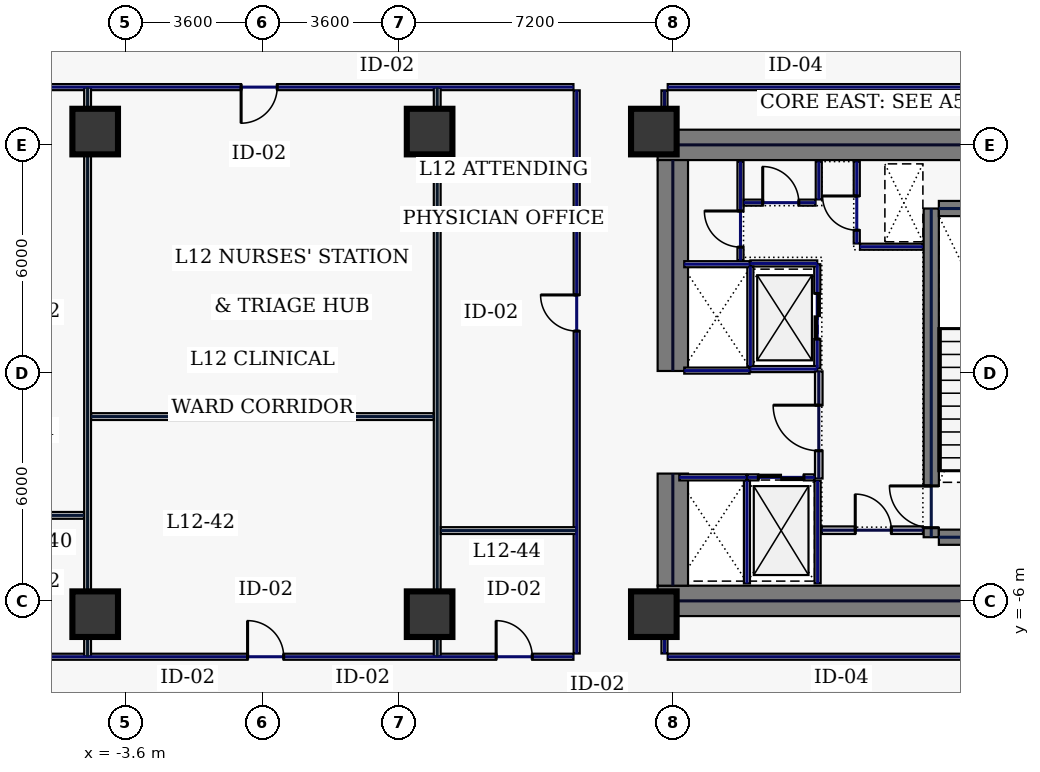
"""IFC4 building model, lengths in metres.
Left out: names, types, materials, properties, quantities, classifications, styles, units other than length and angle.
Written with IfcOpenShell. Run it as: python <this file> out.ifc"""

import sys

from ifc_helpers import new_model, si_unit, direction, frame, frame_2d, origin, origin_2d, place, context, subcontext, project, spatial, rectangle, hollow_rectangle, extrude, element, fill, save


model = new_model("IFC4")
c1 = context("Model", 3, precision=1e-05, world=origin(), true_north=direction((0.0, 1.0)))
c2 = subcontext(c1, "Body", "Model", "MODEL_VIEW")
j1 = project(units=[si_unit("LENGTHUNIT", "METRE"), si_unit("PLANEANGLEUNIT", "RADIAN")], contexts=[c1])
p1 = place(None, origin())
s1 = spatial("IfcSite", under=j1, at=p1, CompositionType="ELEMENT")
p2 = place(p1, origin())
s2 = spatial("IfcBuilding", under=s1, at=p2, CompositionType="ELEMENT")
p3 = place(p2, frame((0.0, 0.0, 59.4)))
s3 = spatial("IfcBuildingStorey", under=s2, at=p3, CompositionType="ELEMENT", Elevation=59.4)
for number, where, z_axis, x_axis in (
    (1, (10.4, 6.0, 0.0), (0.0, 0.0, 1.0), (1.0, 0.0, 0.0)),
    (2, (10.4, -6.0, 0.0), (0.0, 0.0, 1.0), (1.0, 0.0, 0.0)),
):
    element("IfcWall", number, at=place(p3, frame(where, z_axis=z_axis, x_axis=x_axis)), inside=s3, PredefinedType="SHEAR", context=c2, shape_type="SweptSolid", body=[
        extrude(rectangle(XDim=11.6, YDim=0.8, at=frame_2d((5.8, 0.0))), origin(), (0.0, 0.0, 1.0), 3.74),
    ])
p4 = place(p3, frame((10.8, -5.6, 0.0), z_axis=(0.0, 0.0, 1.0), x_axis=(0.0, 1.0, 0.0)))
e3 = element("IfcWall", 3, at=p4, inside=s3, PredefinedType="SHEAR", context=c2, shape_type="SweptSolid", body=[
    extrude(rectangle(XDim=2.95, YDim=0.8, at=frame_2d((1.475, 0.0))), origin(), (0.0, 0.0, 1.0), 3.74),
])
p5 = place(p3, frame((10.8, 0.05, 0.0), z_axis=(0.0, 0.0, 1.0), x_axis=(0.0, 1.0, 0.0)))
e4 = element("IfcWall", 4, at=p5, inside=s3, PredefinedType="SHEAR", context=c2, shape_type="SweptSolid", body=[
    extrude(rectangle(XDim=5.55, YDim=0.8, at=frame_2d((2.775, 0.0))), origin(), (0.0, 0.0, 1.0), 3.74),
])
p6 = place(p3, frame((17.6, -4.325, 0.0), z_axis=(0.0, 0.0, 1.0), x_axis=(0.0, 1.0, 0.0)))
e5 = element("IfcWall", 5, at=p6, inside=s3, PredefinedType="SHEAR", context=c2, shape_type="SweptSolid", body=[
    extrude(rectangle(XDim=8.65, YDim=0.4, at=frame_2d((4.325, 0.0))), origin(), (0.0, 0.0, 1.0), 3.74),
])
p7 = place(p6, frame((0.25, 0.0, 0.0)))
e6 = element("IfcOpeningElement", 6, at=p7, cuts=e5, PredefinedType="OPENING", context=c2, shape_type="SweptSolid", body=[
    extrude(rectangle(XDim=1.1, YDim=2.2, at=frame_2d((0.55, 1.1))), frame((0.0, 0.21, 0.0), z_axis=(0.0, -1.0, 0.0), x_axis=(1.0, 0.0, 0.0)), (0.0, 0.0, 1.0), 0.42),
])
for number, where, z_axis, x_axis in (
    (7, (17.8, -4.325, 0.0), (0.0, 0.0, 1.0), (1.0, 0.0, 0.0)),
    (8, (17.8, 4.325, 0.0), (0.0, 0.0, 1.0), (1.0, 0.0, 0.0)),
):
    element("IfcWall", number, at=place(p3, frame(where, z_axis=z_axis, x_axis=x_axis)), inside=s3, PredefinedType="SHEAR", context=c2, shape_type="SweptSolid", body=[
        extrude(rectangle(XDim=3.4, YDim=0.4, at=frame_2d((1.7, 0.0))), origin(), (0.0, 0.0, 1.0), 3.74),
    ])
for number, where, z_axis, x_axis in (
    (9, (10.3, -6.35, 0.0), (0.0, 0.0, 1.0), (1.0, 0.0, 0.0)),
    (10, (10.3, 6.35, 0.0), (0.0, 0.0, 1.0), (1.0, 0.0, 0.0)),
    (11, (-4.4, -6.35, 0.0), (0.0, 0.0, 1.0), (1.0, 0.0, 0.0)),
    (12, (4.4, -6.35, 0.0), (0.0, 0.0, 1.0), (1.0, 0.0, 0.0)),
    (13, (-4.4, 6.35, 0.0), (0.0, 0.0, 1.0), (1.0, 0.0, 0.0)),
    (14, (4.4, 6.35, 0.0), (0.0, 0.0, 1.0), (1.0, 0.0, 0.0)),
):
    element("IfcColumn", number, at=place(p3, frame(where, z_axis=z_axis, x_axis=x_axis)), inside=s3, PredefinedType="COLUMN", context=c2, shape_type="SweptSolid", body=[
        extrude(hollow_rectangle(XDim=1.2, YDim=1.2, WallThickness=0.05, at=origin_2d()), origin(), (0.0, 0.0, 1.0), 3.74),
    ])
p8 = place(p3, frame((14.6, 0.12, 0.0), z_axis=(0.0, 0.0, 1.0), x_axis=(0.0, 1.0, 0.0)))
e15 = element("IfcWall", 15, at=p8, inside=s3, PredefinedType="PARTITIONING", context=c2, shape_type="SweptSolid", body=[
    extrude(rectangle(XDim=2.74, YDim=0.16, at=frame_2d((1.37, 0.0))), origin(), (0.0, 0.0, 1.0), 3.74),
])
p9 = place(p8, frame((0.77, 0.0, 0.0)))
e16 = element("IfcOpeningElement", 16, at=p9, cuts=e15, PredefinedType="OPENING", context=c2, shape_type="SweptSolid", body=[
    extrude(rectangle(XDim=1.2, YDim=2.2, at=frame_2d((0.6, 1.1))), frame((0.0, 0.09, 0.0), z_axis=(0.0, -1.0, 0.0), x_axis=(1.0, 0.0, 0.0)), (0.0, 0.0, 1.0), 0.18),
])
for number, where, z_axis, x_axis in (
    (17, (12.84, 0.1, 0.0), (0.0, 0.0, 1.0), (1.0, 0.0, 0.0)),
    (18, (12.84, 2.88, 0.0), (0.0, 0.0, 1.0), (1.0, 0.0, 0.0)),
):
    element("IfcWall", number, at=place(p3, frame(where, z_axis=z_axis, x_axis=x_axis)), inside=s3, PredefinedType="PARTITIONING", context=c2, shape_type="SweptSolid", body=[
        extrude(rectangle(XDim=1.76, YDim=0.16, at=frame_2d((0.88, 0.0))), origin(), (0.0, 0.0, 1.0), 3.74),
    ])
p10 = place(p3, frame((12.84, 0.18, 0.0), z_axis=(0.0, 0.0, 1.0), x_axis=(0.0, 1.0, 0.0)))
e19 = element("IfcWall", 19, at=p10, inside=s3, PredefinedType="PARTITIONING", context=c2, shape_type="SweptSolid", body=[
    extrude(rectangle(XDim=2.62, YDim=0.16, at=frame_2d((1.31, 0.0))), origin(), (0.0, 0.0, 1.0), 3.74),
])
p11 = place(p3, frame((12.77, -2.75, 0.0), z_axis=(0.0, 0.0, 1.0), x_axis=(1.0, 0.0, 0.0)))
e20 = element("IfcWall", 20, at=p11, inside=s3, PredefinedType="PARTITIONING", context=c2, shape_type="SweptSolid", body=[
    extrude(rectangle(XDim=1.76, YDim=0.16, at=frame_2d((0.88, 0.0))), origin(), (0.0, 0.0, 1.0), 3.74),
])
p12 = place(p11, frame((0.28, 0.0, 0.0)))
e21 = element("IfcOpeningElement", 21, at=p12, cuts=e20, PredefinedType="OPENING", context=c2, shape_type="SweptSolid", body=[
    extrude(rectangle(XDim=1.2, YDim=2.2, at=frame_2d((0.6, 1.1))), frame((0.0, 0.09, 0.0), z_axis=(0.0, -1.0, 0.0), x_axis=(1.0, 0.0, 0.0)), (0.0, 0.0, 1.0), 0.18),
])
for number, where, z_axis, x_axis in (
    (22, (12.75, -5.54, 0.0), (0.0, 0.0, 1.0), (0.0, 1.0, 0.0)),
    (23, (14.61, -5.54, 0.0), (0.0, 0.0, 1.0), (0.0, 1.0, 0.0)),
):
    element("IfcWall", number, at=place(p3, frame(where, z_axis=z_axis, x_axis=x_axis)), inside=s3, PredefinedType="PARTITIONING", context=c2, shape_type="SweptSolid", body=[
        extrude(rectangle(XDim=2.7, YDim=0.16, at=frame_2d((1.35, 0.0))), origin(), (0.0, 0.0, 1.0), 3.74),
    ])
p13 = place(p3, frame((10.97, -2.75, 0.0), z_axis=(0.0, 0.0, 1.0), x_axis=(1.0, 0.0, 0.0)))
e24 = element("IfcWall", 24, at=p13, inside=s3, PredefinedType="PARTITIONING", context=c2, shape_type="SweptSolid", body=[
    extrude(rectangle(XDim=1.76, YDim=0.16, at=frame_2d((0.88, 0.0))), origin(), (0.0, 0.0, 1.0), 3.74),
])
for number, where, z_axis, x_axis in (
    (25, (11.1, 0.06, 0.0), (0.0, 0.0, 1.0), (1.0, 0.0, 0.0)),
    (26, (11.1, 2.86, 0.0), (0.0, 0.0, 1.0), (1.0, 0.0, 0.0)),
):
    element("IfcWall", number, at=place(p3, frame(where, z_axis=z_axis, x_axis=x_axis)), inside=s3, PredefinedType="PARTITIONING", context=c2, shape_type="SweptSolid", body=[
        extrude(rectangle(XDim=1.72, YDim=0.16, at=frame_2d((0.86, 0.0))), origin(), (0.0, 0.0, 1.0), 3.74),
    ])
p14 = place(p3, frame((15.64, 3.405, 0.0), z_axis=(0.0, 0.0, 1.0), x_axis=(0.0, 1.0, 0.0)))
e27 = element("IfcWall", 27, at=p14, inside=s3, PredefinedType="PARTITIONING", context=c2, shape_type="SweptSolid", body=[
    extrude(rectangle(XDim=2.155, YDim=0.16, at=frame_2d((1.078, 0.0))), origin(), (0.0, 0.0, 1.0), 3.74),
])
p15 = place(p14, frame((0.35, 0.0, 0.0)))
e28 = element("IfcOpeningElement", 28, at=p15, cuts=e27, PredefinedType="OPENING", context=c2, shape_type="SweptSolid", body=[
    extrude(rectangle(XDim=0.9, YDim=2.2, at=frame_2d((0.45, 1.1))), frame((0.0, 0.09, 0.0), z_axis=(0.0, -1.0, 0.0), x_axis=(1.0, 0.0, 0.0)), (0.0, 0.0, 1.0), 0.18),
])
p16 = place(p3, frame((15.725, 3.32, 0.0), z_axis=(0.0, 0.0, 1.0), x_axis=(1.0, 0.0, 0.0)))
e29 = element("IfcWall", 29, at=p16, inside=s3, PredefinedType="PARTITIONING", context=c2, shape_type="SweptSolid", body=[
    extrude(rectangle(XDim=1.655, YDim=0.16, at=frame_2d((0.827, 0.0))), origin(), (0.0, 0.0, 1.0), 3.74),
])
p17 = place(p3, frame((14.72, -4.14, 0.0), z_axis=(0.0, 0.0, 1.0), x_axis=(1.0, 0.0, 0.0)))
e30 = element("IfcWall", 30, at=p17, inside=s3, PredefinedType="SOLIDWALL", context=c2, shape_type="SweptSolid", body=[
    extrude(rectangle(XDim=2.66, YDim=0.2, at=frame_2d((1.33, 0.0))), origin(), (0.0, 0.0, 1.0), 3.74),
])
p18 = place(p17, frame((0.88, 0.0, 0.0)))
e31 = element("IfcOpeningElement", 31, at=p18, cuts=e30, PredefinedType="OPENING", context=c2, shape_type="SweptSolid", body=[
    extrude(rectangle(XDim=0.95, YDim=2.2, at=frame_2d((0.475, 1.1))), frame((0.0, 0.11, 0.0), z_axis=(0.0, -1.0, 0.0), x_axis=(1.0, 0.0, 0.0)), (0.0, 0.0, 1.0), 0.22),
])
p19 = place(p3, frame((12.58, 2.96, 0.0), z_axis=(0.0, 0.0, 1.0), x_axis=(0.0, 1.0, 0.0)))
e32 = element("IfcWall", 32, at=p19, inside=s3, PredefinedType="PARTITIONING", context=c2, shape_type="SweptSolid", body=[
    extrude(rectangle(XDim=2.6, YDim=0.16, at=frame_2d((1.3, 0.0))), origin(), (0.0, 0.0, 1.0), 3.74),
])
p20 = place(p19, frame((0.35, 0.0, 0.0)))
e33 = element("IfcOpeningElement", 33, at=p20, cuts=e32, PredefinedType="OPENING", context=c2, shape_type="SweptSolid", body=[
    extrude(rectangle(XDim=0.95, YDim=2.2, at=frame_2d((0.475, 1.1))), frame((0.0, 0.09, 0.0), z_axis=(0.0, -1.0, 0.0), x_axis=(1.0, 0.0, 0.0)), (0.0, 0.0, 1.0), 0.18),
])
p21 = place(p3, frame((12.665, 4.48, 0.0), z_axis=(0.0, 0.0, 1.0), x_axis=(1.0, 0.0, 0.0)))
e34 = element("IfcWall", 34, at=p21, inside=s3, PredefinedType="PARTITIONING", context=c2, shape_type="SweptSolid", body=[
    extrude(rectangle(XDim=1.89, YDim=0.16, at=frame_2d((0.945, 0.0))), origin(), (0.0, 0.0, 1.0), 3.74),
])
p22 = place(p21, frame((0.5, 0.0, 0.0)))
e35 = element("IfcOpeningElement", 35, at=p22, cuts=e34, PredefinedType="OPENING", context=c2, shape_type="SweptSolid", body=[
    extrude(rectangle(XDim=0.95, YDim=2.2, at=frame_2d((0.475, 1.1))), frame((0.0, 0.09, 0.0), z_axis=(0.0, -1.0, 0.0), x_axis=(1.0, 0.0, 0.0)), (0.0, 0.0, 1.0), 0.18),
])
p23 = place(p3, frame((14.64, 4.565, 0.0), z_axis=(0.0, 0.0, 1.0), x_axis=(0.0, 1.0, 0.0)))
e36 = element("IfcWall", 36, at=p23, inside=s3, PredefinedType="PARTITIONING", context=c2, shape_type="SweptSolid", body=[
    extrude(rectangle(XDim=0.995, YDim=0.16, at=frame_2d((0.498, 0.0))), origin(), (0.0, 0.0, 1.0), 3.74),
])
p24 = place(p3, frame((14.64, -2.78, 0.0), z_axis=(0.0, 0.0, 1.0), x_axis=(0.0, 1.0, 0.0)))
e37 = element("IfcWall", 37, at=p24, inside=s3, PredefinedType="SOLIDWALL", context=c2, shape_type="SweptSolid", body=[
    extrude(rectangle(XDim=2.82, YDim=0.2, at=frame_2d((1.41, 0.0))), origin(), (0.0, 0.0, 1.0), 3.74),
])
p25 = place(p24, frame((0.73, 0.0, 0.0)))
e38 = element("IfcOpeningElement", 38, at=p25, cuts=e37, PredefinedType="OPENING", context=c2, shape_type="SweptSolid", body=[
    extrude(rectangle(XDim=1.2, YDim=2.2, at=frame_2d((0.6, 1.1))), frame((0.0, 0.11, 0.0), z_axis=(0.0, -1.0, 0.0), x_axis=(1.0, 0.0, 0.0)), (0.0, 0.0, 1.0), 0.22),
])
p26 = place(p3, frame((27.185, 7.52, 0.0), z_axis=(0.0, 0.0, 1.0), x_axis=(-1.0, 0.0, 0.0)))
e39 = element("IfcWall", 39, at=p26, inside=s3, PredefinedType="PARTITIONING", context=c2, shape_type="SweptSolid", body=[
    extrude(rectangle(XDim=16.52, YDim=0.16, at=frame_2d((8.26, 0.0))), origin(), (0.0, 0.0, 1.0), 3.74),
])
p27 = place(p3, frame((10.58, 7.435, 0.0), z_axis=(0.0, 0.0, 1.0), x_axis=(0.0, -1.0, 0.0)))
e40 = element("IfcWall", 40, at=p27, inside=s3, PredefinedType="PARTITIONING", context=c2, shape_type="SweptSolid", body=[
    extrude(rectangle(XDim=1.015, YDim=0.16, at=frame_2d((0.508, 0.0))), origin(), (0.0, 0.0, 1.0), 1.535),
])
p28 = place(p3, frame((10.58, -6.42, 0.0), z_axis=(0.0, 0.0, 1.0), x_axis=(0.0, -1.0, 0.0)))
e41 = element("IfcWall", 41, at=p28, inside=s3, PredefinedType="PARTITIONING", context=c2, shape_type="SweptSolid", body=[
    extrude(rectangle(XDim=0.965, YDim=0.16, at=frame_2d((0.482, 0.0))), origin(), (0.0, 0.0, 1.0), 3.74),
])
p29 = place(p3, frame((10.665, -7.47, 0.0), z_axis=(0.0, 0.0, 1.0), x_axis=(1.0, 0.0, 0.0)))
e42 = element("IfcWall", 42, at=p29, inside=s3, PredefinedType="PARTITIONING", context=c2, shape_type="SweptSolid", body=[
    extrude(rectangle(XDim=16.52, YDim=0.16, at=frame_2d((8.26, 0.0))), origin(), (0.0, 0.0, 1.0), 3.74),
])
p30 = place(p3, frame((8.27, -7.385, 0.0), z_axis=(0.0, 0.0, 1.0), x_axis=(0.0, 1.0, 0.0)))
e43 = element("IfcWall", 43, at=p30, inside=s3, PredefinedType="PARTITIONING", context=c2, shape_type="SweptSolid", body=[
    extrude(rectangle(XDim=14.82, YDim=0.16, at=frame_2d((7.41, 0.0))), origin(), (0.0, 0.0, 1.0), 3.74),
])
p31 = place(p30, frame((8.486, 0.0, 0.0)))
e44 = element("IfcOpeningElement", 44, at=p31, cuts=e43, PredefinedType="OPENING", context=c2, shape_type="SweptSolid", body=[
    extrude(rectangle(XDim=0.95, YDim=2.2, at=frame_2d((0.475, 1.1))), frame((0.0, 0.09, 0.0), z_axis=(0.0, -1.0, 0.0), x_axis=(1.0, 0.0, 0.0)), (0.0, 0.0, 1.0), 0.18),
])
p32 = place(p3, frame((8.185, 7.52, 0.0), z_axis=(0.0, 0.0, 1.0), x_axis=(-1.0, 0.0, 0.0)))
e45 = element("IfcWall", 45, at=p32, inside=s3, PredefinedType="PARTITIONING", context=c2, shape_type="SweptSolid", body=[
    extrude(rectangle(XDim=16.37, YDim=0.16, at=frame_2d((8.185, 0.0))), origin(), (0.0, 0.0, 1.0), 3.74),
])
p33 = place(p32, frame((7.795, 0.0, 0.0)))
e46 = element("IfcOpeningElement", 46, at=p33, cuts=e45, PredefinedType="OPENING", context=c2, shape_type="SweptSolid", body=[
    extrude(rectangle(XDim=0.95, YDim=2.2, at=frame_2d((0.475, 1.1))), frame((0.0, 0.09, 0.0), z_axis=(0.0, -1.0, 0.0), x_axis=(1.0, 0.0, 0.0)), (0.0, 0.0, 1.0), 0.18),
])
p34 = place(p3, frame((-8.185, -7.47, 0.0), z_axis=(0.0, 0.0, 1.0), x_axis=(1.0, 0.0, 0.0)))
e47 = element("IfcWall", 47, at=p34, inside=s3, PredefinedType="PARTITIONING", context=c2, shape_type="SweptSolid", body=[
    extrude(rectangle(XDim=16.37, YDim=0.16, at=frame_2d((8.185, 0.0))), origin(), (0.0, 0.0, 1.0), 3.74),
])
p35 = place(p34, frame((7.795, 0.0, 0.0)))
e48 = element("IfcOpeningElement", 48, at=p35, cuts=e47, PredefinedType="OPENING", context=c2, shape_type="SweptSolid", body=[
    extrude(rectangle(XDim=0.95, YDim=2.2, at=frame_2d((0.475, 1.1))), frame((0.0, 0.09, 0.0), z_axis=(0.0, -1.0, 0.0), x_axis=(1.0, 0.0, 0.0)), (0.0, 0.0, 1.0), 0.18),
])
p36 = place(p34, frame((14.336, 0.0, 0.0)))
e49 = element("IfcOpeningElement", 49, at=p36, cuts=e47, PredefinedType="OPENING", context=c2, shape_type="SweptSolid", body=[
    extrude(rectangle(XDim=0.95, YDim=2.2, at=frame_2d((0.475, 1.1))), frame((0.0, 0.09, 0.0), z_axis=(0.0, -1.0, 0.0), x_axis=(1.0, 0.0, 0.0)), (0.0, 0.0, 1.0), 0.18),
])
for number, where, z_axis, x_axis in (
    (50, (-4.6, -7.465, 0.0), (0.0, 0.0, 1.0), (0.0, 1.0, 0.0)),
    (51, (4.6, -7.465, 0.0), (0.0, 0.0, 1.0), (0.0, 1.0, 0.0)),
):
    element("IfcWall", number, at=place(p3, frame(where, z_axis=z_axis, x_axis=x_axis)), inside=s3, PredefinedType="PARTITIONING", context=c2, shape_type="SweptSolid", body=[
        extrude(rectangle(XDim=14.98, YDim=0.18, at=frame_2d((7.49, 0.0))), origin(), (0.0, 0.0, 1.0), 2.935),
    ])
p37 = place(p3, frame((-4.505, -1.15, 0.0), z_axis=(0.0, 0.0, 1.0), x_axis=(1.0, 0.0, 0.0)))
e52 = element("IfcWall", 52, at=p37, inside=s3, PredefinedType="PARTITIONING", context=c2, shape_type="SweptSolid", body=[
    extrude(rectangle(XDim=9.01, YDim=0.18, at=frame_2d((4.505, 0.0))), origin(), (0.0, 0.0, 1.0), 3.74),
])
for number, where, z_axis, x_axis in (
    (53, (-8.265, -3.75, 0.0), (0.0, 0.0, 1.0), (1.0, 0.0, 0.0)),
    (54, (4.695, -4.15, 0.0), (0.0, 0.0, 1.0), (1.0, 0.0, 0.0)),
):
    element("IfcWall", number, at=place(p3, frame(where, z_axis=z_axis, x_axis=x_axis)), inside=s3, PredefinedType="PARTITIONING", context=c2, shape_type="SweptSolid", body=[
        extrude(rectangle(XDim=3.57, YDim=0.18, at=frame_2d((1.785, 0.0))), origin(), (0.0, 0.0, 1.0), 3.74),
    ])
p38 = place(p7, origin())
e55 = element("IfcDoor", 55, at=p38, inside=s3, OperationType="SINGLE_SWING_RIGHT", PredefinedType="DOOR", context=c2, shape_type="SweptSolid", body=[
    extrude(rectangle(XDim=1.1, YDim=2.2, at=frame_2d((0.55, 1.1))), frame((0.0, 0.025, 0.0), z_axis=(0.0, -1.0, 0.0), x_axis=(1.0, 0.0, 0.0)), (0.0, 0.0, 1.0), 0.05),
])
fill(e6, e55)
p39 = place(p9, origin())
e56 = element("IfcDoor", 56, at=p39, inside=s3, OperationType="SLIDING_TO_LEFT", PredefinedType="DOOR", context=c2, shape_type="SweptSolid", body=[
    extrude(rectangle(XDim=1.2, YDim=2.2, at=frame_2d((0.6, 1.1))), frame((0.0, 0.025, 0.0), z_axis=(0.0, -1.0, 0.0), x_axis=(1.0, 0.0, 0.0)), (0.0, 0.0, 1.0), 0.05),
])
fill(e16, e56)
p40 = place(p12, origin())
e57 = element("IfcDoor", 57, at=p40, inside=s3, OperationType="SLIDING_TO_LEFT", PredefinedType="DOOR", context=c2, shape_type="SweptSolid", body=[
    extrude(rectangle(XDim=1.2, YDim=2.2, at=frame_2d((0.6, 1.1))), frame((0.0, 0.025, 0.0), z_axis=(0.0, -1.0, 0.0), x_axis=(1.0, 0.0, 0.0)), (0.0, 0.0, 1.0), 0.05),
])
fill(e21, e57)
p41 = place(p15, origin())
e58 = element("IfcDoor", 58, at=p41, inside=s3, OperationType="SINGLE_SWING_RIGHT", PredefinedType="DOOR", context=c2, shape_type="SweptSolid", body=[
    extrude(rectangle(XDim=0.9, YDim=2.2, at=frame_2d((0.45, 1.1))), frame((0.0, 0.025, 0.0), z_axis=(0.0, -1.0, 0.0), x_axis=(1.0, 0.0, 0.0)), (0.0, 0.0, 1.0), 0.05),
])
fill(e28, e58)
p42 = place(p18, origin())
e59 = element("IfcDoor", 59, at=p42, inside=s3, OperationType="SINGLE_SWING_LEFT", PredefinedType="DOOR", context=c2, shape_type="SweptSolid", body=[
    extrude(rectangle(XDim=0.95, YDim=2.2, at=frame_2d((0.475, 1.1))), frame((0.0, 0.025, 0.0), z_axis=(0.0, -1.0, 0.0), x_axis=(1.0, 0.0, 0.0)), (0.0, 0.0, 1.0), 0.05),
])
fill(e31, e59)
p43 = place(p20, origin())
e60 = element("IfcDoor", 60, at=p43, inside=s3, OperationType="SINGLE_SWING_RIGHT", PredefinedType="DOOR", context=c2, shape_type="SweptSolid", body=[
    extrude(rectangle(XDim=0.95, YDim=2.2, at=frame_2d((0.475, 1.1))), frame((0.0, 0.025, 0.0), z_axis=(0.0, -1.0, 0.0), x_axis=(1.0, 0.0, 0.0)), (0.0, 0.0, 1.0), 0.05),
])
fill(e33, e60)
p44 = place(p22, origin())
e61 = element("IfcDoor", 61, at=p44, inside=s3, OperationType="SINGLE_SWING_LEFT", PredefinedType="DOOR", context=c2, shape_type="SweptSolid", body=[
    extrude(rectangle(XDim=0.95, YDim=2.2, at=frame_2d((0.475, 1.1))), frame((0.0, 0.025, 0.0), z_axis=(0.0, -1.0, 0.0), x_axis=(1.0, 0.0, 0.0)), (0.0, 0.0, 1.0), 0.05),
])
fill(e35, e61)
p45 = place(p25, origin())
e62 = element("IfcDoor", 62, at=p45, inside=s3, OperationType="SINGLE_SWING_RIGHT", PredefinedType="DOOR", context=c2, shape_type="SweptSolid", body=[
    extrude(rectangle(XDim=1.2, YDim=2.2, at=frame_2d((0.6, 1.1))), frame((0.0, 0.025, 0.0), z_axis=(0.0, -1.0, 0.0), x_axis=(1.0, 0.0, 0.0)), (0.0, 0.0, 1.0), 0.05),
])
fill(e38, e62)
p46 = place(p35, origin())
e63 = element("IfcDoor", 63, at=p46, inside=s3, OperationType="SINGLE_SWING_LEFT", PredefinedType="DOOR", context=c2, shape_type="SweptSolid", body=[
    extrude(rectangle(XDim=0.95, YDim=2.2, at=frame_2d((0.475, 1.1))), frame((0.0, 0.025, 0.0), z_axis=(0.0, -1.0, 0.0), x_axis=(1.0, 0.0, 0.0)), (0.0, 0.0, 1.0), 0.05),
])
fill(e48, e63)
p47 = place(p33, origin())
e64 = element("IfcDoor", 64, at=p47, inside=s3, OperationType="SINGLE_SWING_RIGHT", PredefinedType="DOOR", context=c2, shape_type="SweptSolid", body=[
    extrude(rectangle(XDim=0.95, YDim=2.2, at=frame_2d((0.475, 1.1))), frame((0.0, 0.025, 0.0), z_axis=(0.0, -1.0, 0.0), x_axis=(1.0, 0.0, 0.0)), (0.0, 0.0, 1.0), 0.05),
])
fill(e46, e64)
p48 = place(p36, origin())
e65 = element("IfcDoor", 65, at=p48, inside=s3, OperationType="SINGLE_SWING_LEFT", PredefinedType="DOOR", context=c2, shape_type="SweptSolid", body=[
    extrude(rectangle(XDim=0.95, YDim=2.2, at=frame_2d((0.475, 1.1))), frame((0.0, 0.025, 0.0), z_axis=(0.0, -1.0, 0.0), x_axis=(1.0, 0.0, 0.0)), (0.0, 0.0, 1.0), 0.05),
])
fill(e49, e65)
p49 = place(p31, origin())
e66 = element("IfcDoor", 66, at=p49, inside=s3, OperationType="SINGLE_SWING_RIGHT", PredefinedType="DOOR", context=c2, shape_type="SweptSolid", body=[
    extrude(rectangle(XDim=0.95, YDim=2.2, at=frame_2d((0.475, 1.1))), frame((0.0, 0.025, 0.0), z_axis=(0.0, -1.0, 0.0), x_axis=(1.0, 0.0, 0.0)), (0.0, 0.0, 1.0), 0.05),
])
fill(e44, e66)
save(model, sys.argv[1])
